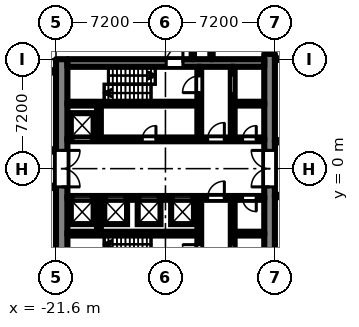
"""IFC4 building model, lengths in metres.
Left out: names, types, materials, properties, quantities, classifications, styles, units other than length and angle.
Written with IfcOpenShell. Run it as: python <this file> out.ifc"""

import sys

from ifc_helpers import new_model, si_unit, direction, frame, frame_2d, origin, place, context, subcontext, project, spatial, rectangle, extrude, element, fill, save


model = new_model("IFC4")
c1 = context("Model", 3, precision=1e-05, world=origin(), true_north=direction((0.0, 1.0)))
c2 = subcontext(c1, "Body", "Model", "MODEL_VIEW")
j1 = project(units=[si_unit("LENGTHUNIT", "METRE"), si_unit("PLANEANGLEUNIT", "RADIAN")], contexts=[c1])
p1 = place(None, origin())
s1 = spatial("IfcSite", under=j1, at=p1, CompositionType="ELEMENT")
p2 = place(p1, origin())
s2 = spatial("IfcBuilding", under=s1, at=p2, CompositionType="ELEMENT")
p3 = place(p2, origin())
s3 = spatial("IfcBuildingStorey", under=s2, at=p3, CompositionType="ELEMENT", Elevation=0.0)
p4 = place(p3, frame((-7.55, -7.548, 0.0), z_axis=(0.0, 0.0, 1.0), x_axis=(0.0, 1.0, 0.0)))
e1 = element("IfcWall", 1, at=p4, inside=s3, PredefinedType="SHEAR", context=c2, shape_type="SweptSolid", body=[
    extrude(rectangle(XDim=15.096, YDim=0.7, at=frame_2d((7.548, 0.0))), origin(), (0.0, 0.0, 1.0), 6.6),
])
p5 = place(p4, frame((6.348, 0.0, 0.0)))
e2 = element("IfcOpeningElement", 2, at=p5, cuts=e1, PredefinedType="OPENING", context=c2, shape_type="SweptSolid", body=[
    extrude(rectangle(XDim=2.4, YDim=2.2, at=frame_2d((1.2, 1.1))), frame((0.0, 0.36, 0.0), z_axis=(0.0, -1.0, 0.0), x_axis=(1.0, 0.0, 0.0)), (0.0, 0.0, 1.0), 0.72),
])
p6 = place(p3, frame((-21.225, -7.2, 0.0), z_axis=(0.0, 0.0, 1.0), x_axis=(0.0, 1.0, 0.0)))
e3 = element("IfcWall", 3, at=p6, inside=s3, PredefinedType="SHEAR", context=c2, shape_type="SweptSolid", body=[
    extrude(rectangle(XDim=14.4, YDim=0.75, at=frame_2d((7.2, 0.0))), origin(), (0.0, 0.0, 1.0), 6.6),
])
p7 = place(p6, frame((6.0, 0.0, 0.0)))
e4 = element("IfcOpeningElement", 4, at=p7, cuts=e3, PredefinedType="OPENING", context=c2, shape_type="SweptSolid", body=[
    extrude(rectangle(XDim=2.4, YDim=2.2, at=frame_2d((1.2, 1.1))), frame((0.0, 0.385, 0.0), z_axis=(0.0, -1.0, 0.0), x_axis=(1.0, 0.0, 0.0)), (0.0, 0.0, 1.0), 0.77),
])
p8 = place(p3, frame((-7.9, 6.95, 0.0), z_axis=(0.0, 0.0, 1.0), x_axis=(-1.0, 0.0, 0.0)))
e5 = element("IfcWall", 5, at=p8, inside=s3, PredefinedType="SHEAR", context=c2, shape_type="SweptSolid", body=[
    extrude(rectangle(XDim=12.95, YDim=0.5, at=frame_2d((6.475, 0.0))), origin(), (0.0, 0.0, 1.0), 6.6),
])
p9 = place(p8, frame((5.35, 0.0, 0.0)))
e6 = element("IfcOpeningElement", 6, at=p9, cuts=e5, PredefinedType="OPENING", context=c2, shape_type="SweptSolid", body=[
    extrude(rectangle(XDim=1.1, YDim=2.1, at=frame_2d((0.55, 1.05))), frame((0.0, 0.26, 0.0), z_axis=(0.0, -1.0, 0.0), x_axis=(1.0, 0.0, 0.0)), (0.0, 0.0, 1.0), 0.52),
])
p10 = place(p3, frame((-7.9, 1.925, 0.0), z_axis=(0.0, 0.0, 1.0), x_axis=(-1.0, 0.0, 0.0)))
e7 = element("IfcWall", 7, at=p10, inside=s3, PredefinedType="SHEAR", context=c2, shape_type="SweptSolid", body=[
    extrude(rectangle(XDim=12.95, YDim=0.25, at=frame_2d((6.475, 0.0))), origin(), (0.0, 0.0, 1.0), 6.6),
])
p11 = place(p10, frame((11.425, 0.0, 0.0)))
e8 = element("IfcOpeningElement", 8, at=p11, cuts=e7, PredefinedType="OPENING", context=c2, shape_type="SweptSolid", body=[
    extrude(rectangle(XDim=1.1, YDim=2.1, at=frame_2d((0.55, 1.05))), frame((0.0, 0.135, 0.0), z_axis=(0.0, -1.0, 0.0), x_axis=(1.0, 0.0, 0.0)), (0.0, 0.0, 1.0), 0.27),
])
p12 = place(p10, frame((0.525, 0.0, 0.0)))
e9 = element("IfcOpeningElement", 9, at=p12, cuts=e7, PredefinedType="OPENING", context=c2, shape_type="SweptSolid", body=[
    extrude(rectangle(XDim=0.9, YDim=2.1, at=frame_2d((0.45, 1.05))), frame((0.0, 0.135, 0.0), z_axis=(0.0, -1.0, 0.0), x_axis=(1.0, 0.0, 0.0)), (0.0, 0.0, 1.0), 0.27),
])
p13 = place(p10, frame((2.625, 0.0, 0.0)))
e10 = element("IfcOpeningElement", 10, at=p13, cuts=e7, PredefinedType="OPENING", context=c2, shape_type="SweptSolid", body=[
    extrude(rectangle(XDim=1.1, YDim=2.1, at=frame_2d((0.55, 1.05))), frame((0.0, 0.135, 0.0), z_axis=(0.0, -1.0, 0.0), x_axis=(1.0, 0.0, 0.0)), (0.0, 0.0, 1.0), 0.27),
])
p14 = place(p10, frame((7.125, 0.0, 0.0)))
e11 = element("IfcOpeningElement", 11, at=p14, cuts=e7, PredefinedType="OPENING", context=c2, shape_type="SweptSolid", body=[
    extrude(rectangle(XDim=0.9, YDim=2.1, at=frame_2d((0.45, 1.05))), frame((0.0, 0.135, 0.0), z_axis=(0.0, -1.0, 0.0), x_axis=(1.0, 0.0, 0.0)), (0.0, 0.0, 1.0), 0.27),
])
p15 = place(p3, frame((-7.9, 4.275, 0.0), z_axis=(0.0, 0.0, 1.0), x_axis=(-1.0, 0.0, 0.0)))
e12 = element("IfcWall", 12, at=p15, inside=s3, PredefinedType="SHEAR", context=c2, shape_type="SweptSolid", body=[
    extrude(rectangle(XDim=1.95, YDim=0.25, at=frame_2d((0.975, 0.0))), origin(), (0.0, 0.0, 1.0), 6.6),
])
p16 = place(p3, frame((-12.3, 4.275, 0.0), z_axis=(0.0, 0.0, 1.0), x_axis=(-1.0, 0.0, 0.0)))
e13 = element("IfcWall", 13, at=p16, inside=s3, PredefinedType="SHEAR", context=c2, shape_type="SweptSolid", body=[
    extrude(rectangle(XDim=8.55, YDim=0.25, at=frame_2d((4.275, 0.0))), origin(), (0.0, 0.0, 1.0), 6.6),
])
p17 = place(p3, frame((-9.975, 2.05, 0.0), z_axis=(0.0, 0.0, 1.0), x_axis=(0.0, 1.0, 0.0)))
e14 = element("IfcWall", 14, at=p17, inside=s3, PredefinedType="SHEAR", context=c2, shape_type="SweptSolid", body=[
    extrude(rectangle(XDim=4.65, YDim=0.25, at=frame_2d((2.325, 0.0))), origin(), (0.0, 0.0, 1.0), 6.6),
])
p18 = place(p17, frame((2.95, 0.0, 0.0)))
e15 = element("IfcOpeningElement", 15, at=p18, cuts=e14, PredefinedType="OPENING", context=c2, shape_type="SweptSolid", body=[
    extrude(rectangle(XDim=1.1, YDim=2.1, at=frame_2d((0.55, 1.05))), frame((0.0, 0.135, 0.0), z_axis=(0.0, -1.0, 0.0), x_axis=(1.0, 0.0, 0.0)), (0.0, 0.0, 1.0), 0.27),
])
p19 = place(p3, frame((-12.175, 2.05, 0.0), z_axis=(0.0, 0.0, 1.0), x_axis=(0.0, 1.0, 0.0)))
e16 = element("IfcWall", 16, at=p19, inside=s3, PredefinedType="SHEAR", context=c2, shape_type="SweptSolid", body=[
    extrude(rectangle(XDim=4.65, YDim=0.25, at=frame_2d((2.325, 0.0))), origin(), (0.0, 0.0, 1.0), 6.6),
])
p20 = place(p19, frame((2.95, 0.0, 0.0)))
e17 = element("IfcOpeningElement", 17, at=p20, cuts=e16, PredefinedType="OPENING", context=c2, shape_type="SweptSolid", body=[
    extrude(rectangle(XDim=1.1, YDim=2.1, at=frame_2d((0.55, 1.05))), frame((0.0, 0.135, 0.0), z_axis=(0.0, -1.0, 0.0), x_axis=(1.0, 0.0, 0.0)), (0.0, 0.0, 1.0), 0.27),
])
p21 = place(p3, frame((-18.775, 2.05, 0.0), z_axis=(0.0, 0.0, 1.0), x_axis=(0.0, 1.0, 0.0)))
e18 = element("IfcWall", 18, at=p21, inside=s3, PredefinedType="PARTITIONING", context=c2, shape_type="SweptSolid", body=[
    extrude(rectangle(XDim=2.1, YDim=0.25, at=frame_2d((1.05, 0.0))), origin(), (0.0, 0.0, 1.0), 6.6),
])
p22 = place(p3, frame((-7.9, -1.925, 0.0), z_axis=(0.0, 0.0, 1.0), x_axis=(-1.0, 0.0, 0.0)))
e19 = element("IfcWall", 19, at=p22, inside=s3, PredefinedType="SHEAR", context=c2, shape_type="SweptSolid", body=[
    extrude(rectangle(XDim=12.95, YDim=0.25, at=frame_2d((6.475, 0.0))), origin(), (0.0, 0.0, 1.0), 6.6),
])
p23 = place(p22, frame((4.825, 0.0, 0.0)))
e20 = element("IfcOpeningElement", 20, at=p23, cuts=e19, PredefinedType="OPENING", context=c2, shape_type="SweptSolid", body=[
    extrude(rectangle(XDim=1.1, YDim=2.1, at=frame_2d((0.55, 1.05))), frame((0.0, 0.135, 0.0), z_axis=(0.0, -1.0, 0.0), x_axis=(1.0, 0.0, 0.0)), (0.0, 0.0, 1.0), 0.27),
])
p24 = place(p22, frame((7.025, 0.0, 0.0)))
e21 = element("IfcOpeningElement", 21, at=p24, cuts=e19, PredefinedType="OPENING", context=c2, shape_type="SweptSolid", body=[
    extrude(rectangle(XDim=1.1, YDim=2.1, at=frame_2d((0.55, 1.05))), frame((0.0, 0.135, 0.0), z_axis=(0.0, -1.0, 0.0), x_axis=(1.0, 0.0, 0.0)), (0.0, 0.0, 1.0), 0.27),
])
p25 = place(p22, frame((9.225, 0.0, 0.0)))
e22 = element("IfcOpeningElement", 22, at=p25, cuts=e19, PredefinedType="OPENING", context=c2, shape_type="SweptSolid", body=[
    extrude(rectangle(XDim=1.1, YDim=2.1, at=frame_2d((0.55, 1.05))), frame((0.0, 0.135, 0.0), z_axis=(0.0, -1.0, 0.0), x_axis=(1.0, 0.0, 0.0)), (0.0, 0.0, 1.0), 0.27),
])
p26 = place(p22, frame((11.425, 0.0, 0.0)))
e23 = element("IfcOpeningElement", 23, at=p26, cuts=e19, PredefinedType="OPENING", context=c2, shape_type="SweptSolid", body=[
    extrude(rectangle(XDim=1.1, YDim=2.1, at=frame_2d((0.55, 1.05))), frame((0.0, 0.135, 0.0), z_axis=(0.0, -1.0, 0.0), x_axis=(1.0, 0.0, 0.0)), (0.0, 0.0, 1.0), 0.27),
])
p27 = place(p22, frame((0.525, 0.0, 0.0)))
e24 = element("IfcOpeningElement", 24, at=p27, cuts=e19, PredefinedType="OPENING", context=c2, shape_type="SweptSolid", body=[
    extrude(rectangle(XDim=0.9, YDim=2.1, at=frame_2d((0.45, 1.05))), frame((0.0, 0.135, 0.0), z_axis=(0.0, -1.0, 0.0), x_axis=(1.0, 0.0, 0.0)), (0.0, 0.0, 1.0), 0.27),
])
p28 = place(p22, frame((2.625, 0.0, 0.0)))
e25 = element("IfcOpeningElement", 25, at=p28, cuts=e19, PredefinedType="OPENING", context=c2, shape_type="SweptSolid", body=[
    extrude(rectangle(XDim=1.1, YDim=2.1, at=frame_2d((0.55, 1.05))), frame((0.0, 0.135, 0.0), z_axis=(0.0, -1.0, 0.0), x_axis=(1.0, 0.0, 0.0)), (0.0, 0.0, 1.0), 0.27),
])
p29 = place(p3, frame((-7.9, -4.275, 0.0), z_axis=(0.0, 0.0, 1.0), x_axis=(-1.0, 0.0, 0.0)))
e26 = element("IfcWall", 26, at=p29, inside=s3, PredefinedType="SHEAR", context=c2, shape_type="SweptSolid", body=[
    extrude(rectangle(XDim=1.95, YDim=0.25, at=frame_2d((0.975, 0.0))), origin(), (0.0, 0.0, 1.0), 6.6),
])
p30 = place(p3, frame((-12.3, -4.275, 0.0), z_axis=(0.0, 0.0, 1.0), x_axis=(-1.0, 0.0, 0.0)))
e27 = element("IfcWall", 27, at=p30, inside=s3, PredefinedType="SHEAR", context=c2, shape_type="SweptSolid", body=[
    extrude(rectangle(XDim=8.55, YDim=0.25, at=frame_2d((4.275, 0.0))), origin(), (0.0, 0.0, 1.0), 6.6),
])
p31 = place(p3, frame((-9.975, -2.05, 0.0), z_axis=(0.0, 0.0, 1.0), x_axis=(0.0, -1.0, 0.0)))
e28 = element("IfcWall", 28, at=p31, inside=s3, PredefinedType="SHEAR", context=c2, shape_type="SweptSolid", body=[
    extrude(rectangle(XDim=4.65, YDim=0.25, at=frame_2d((2.325, 0.0))), origin(), (0.0, 0.0, 1.0), 6.6),
])
p32 = place(p31, frame((2.95, 0.0, 0.0)))
e29 = element("IfcOpeningElement", 29, at=p32, cuts=e28, PredefinedType="OPENING", context=c2, shape_type="SweptSolid", body=[
    extrude(rectangle(XDim=1.1, YDim=2.1, at=frame_2d((0.55, 1.05))), frame((0.0, 0.135, 0.0), z_axis=(0.0, -1.0, 0.0), x_axis=(1.0, 0.0, 0.0)), (0.0, 0.0, 1.0), 0.27),
])
p33 = place(p3, frame((-12.175, -2.05, 0.0), z_axis=(0.0, 0.0, 1.0), x_axis=(0.0, -1.0, 0.0)))
e30 = element("IfcWall", 30, at=p33, inside=s3, PredefinedType="SHEAR", context=c2, shape_type="SweptSolid", body=[
    extrude(rectangle(XDim=4.65, YDim=0.25, at=frame_2d((2.325, 0.0))), origin(), (0.0, 0.0, 1.0), 6.6),
])
p34 = place(p33, frame((2.95, 0.0, 0.0)))
e31 = element("IfcOpeningElement", 31, at=p34, cuts=e30, PredefinedType="OPENING", context=c2, shape_type="SweptSolid", body=[
    extrude(rectangle(XDim=1.1, YDim=2.1, at=frame_2d((0.55, 1.05))), frame((0.0, 0.135, 0.0), z_axis=(0.0, -1.0, 0.0), x_axis=(1.0, 0.0, 0.0)), (0.0, 0.0, 1.0), 0.27),
])
p35 = place(p3, frame((-18.775, -2.05, 0.0), z_axis=(0.0, 0.0, 1.0), x_axis=(0.0, -1.0, 0.0)))
e32 = element("IfcWall", 32, at=p35, inside=s3, PredefinedType="PARTITIONING", context=c2, shape_type="SweptSolid", body=[
    extrude(rectangle(XDim=2.1, YDim=0.25, at=frame_2d((1.05, 0.0))), origin(), (0.0, 0.0, 1.0), 6.6),
])
p36 = place(p3, frame((-50.22, 6.4, 0.0), z_axis=(0.0, 0.0, 1.0), x_axis=(1.0, 0.0, 0.0)))
e33 = element("IfcWall", 33, at=p36, inside=s3, PredefinedType="PARTITIONING", context=c2, shape_type="SweptSolid", body=[
    extrude(rectangle(XDim=28.62, YDim=0.15, at=frame_2d((14.31, 0.0))), origin(), (0.0, 0.0, 1.0), 6.6),
])
p37 = place(p36, frame((16.82, 0.0, 0.0)))
e34 = element("IfcOpeningElement", 34, at=p37, cuts=e33, PredefinedType="OPENING", context=c2, shape_type="SweptSolid", body=[
    extrude(rectangle(XDim=2.0, YDim=2.1, at=frame_2d((1.0, 1.05))), frame((0.0, 0.085, 0.0), z_axis=(0.0, -1.0, 0.0), x_axis=(1.0, 0.0, 0.0)), (0.0, 0.0, 1.0), 0.17),
])
for number, where, z_axis, x_axis in (
    (35, (-31.125, -1.2, 0.0), (0.0, 0.0, 1.0), (1.0, 0.0, 0.0)),
    (36, (-31.125, 1.2, 0.0), (0.0, 0.0, 1.0), (1.0, 0.0, 0.0)),
):
    element("IfcWall", number, at=place(p3, frame(where, z_axis=z_axis, x_axis=x_axis)), inside=s3, PredefinedType="PARTITIONING", context=c2, shape_type="SweptSolid", body=[
        extrude(rectangle(XDim=9.525, YDim=0.15, at=frame_2d((4.762, 0.0))), origin(), (0.0, 0.0, 1.0), 6.6),
    ])
p38 = place(p3, frame((-12.6, 7.2, 0.0), z_axis=(0.0, 0.0, 1.0), x_axis=(0.0, 1.0, 0.0)))
e37 = element("IfcWall", 37, at=p38, inside=s3, PredefinedType="PARTITIONING", context=c2, shape_type="SweptSolid", body=[
    extrude(rectangle(XDim=3.125, YDim=0.15, at=frame_2d((1.562, 0.0))), origin(), (0.0, 0.0, 1.0), 6.6),
])
p39 = place(p3, frame((-11.37, 7.2, 0.0), z_axis=(0.0, 0.0, 1.0), x_axis=(0.0, 1.0, 0.0)))
e38 = element("IfcWall", 38, at=p39, inside=s3, PredefinedType="PARTITIONING", context=c2, shape_type="SweptSolid", body=[
    extrude(rectangle(XDim=9.525, YDim=0.15, at=frame_2d((4.763, 0.0))), origin(), (0.0, 0.0, 1.0), 6.6),
])
p40 = place(p3, frame((-7.2, -1.8, 0.0), z_axis=(0.0, 0.0, 1.0), x_axis=(1.0, 0.0, 0.0)))
e39 = element("IfcWall", 39, at=p40, inside=s3, PredefinedType="PARTITIONING", context=c2, shape_type="SweptSolid", body=[
    extrude(rectangle(XDim=5.475, YDim=0.15, at=frame_2d((2.737, 0.0))), origin(), (0.0, 0.0, 1.0), 6.6),
])
p41 = place(p3, frame((-7.2, 1.8, 0.0), z_axis=(0.0, 0.0, 1.0), x_axis=(1.0, 0.0, 0.0)))
e40 = element("IfcWall", 40, at=p41, inside=s3, PredefinedType="PARTITIONING", context=c2, shape_type="SweptSolid", body=[
    extrude(rectangle(XDim=5.475, YDim=0.15, at=frame_2d((2.737, 0.0))), origin(), (0.0, 0.0, 1.0), 6.6),
])
p42 = place(p41, frame((4.4, 0.0, 0.0)))
e41 = element("IfcOpeningElement", 41, at=p42, cuts=e40, PredefinedType="OPENING", context=c2, shape_type="SweptSolid", body=[
    extrude(rectangle(XDim=0.9, YDim=2.1, at=frame_2d((0.45, 1.05))), frame((0.0, 0.085, 0.0), z_axis=(0.0, -1.0, 0.0), x_axis=(1.0, 0.0, 0.0)), (0.0, 0.0, 1.0), 0.17),
])
p43 = place(p3, frame((-7.2, 7.2, 0.0), z_axis=(0.0, 0.0, 1.0), x_axis=(1.0, 0.0, 0.0)))
e42 = element("IfcWall", 42, at=p43, inside=s3, PredefinedType="PARTITIONING", context=c2, shape_type="SweptSolid", body=[
    extrude(rectangle(XDim=5.4, YDim=0.1, at=frame_2d((2.7, 0.0))), origin(), (0.0, 0.0, 1.0), 6.6),
])
p44 = place(p23, origin())
e43 = element("IfcDoor", 43, at=p44, inside=s3, OperationType="SLIDING_TO_LEFT", PredefinedType="DOOR", context=c2, shape_type="SweptSolid", body=[
    extrude(rectangle(XDim=1.1, YDim=2.1, at=frame_2d((0.55, 1.05))), frame((0.0, 0.025, 0.0), z_axis=(0.0, -1.0, 0.0), x_axis=(1.0, 0.0, 0.0)), (0.0, 0.0, 1.0), 0.05),
])
fill(e20, e43)
p45 = place(p24, origin())
e44 = element("IfcDoor", 44, at=p45, inside=s3, OperationType="SLIDING_TO_LEFT", PredefinedType="DOOR", context=c2, shape_type="SweptSolid", body=[
    extrude(rectangle(XDim=1.1, YDim=2.1, at=frame_2d((0.55, 1.05))), frame((0.0, 0.025, 0.0), z_axis=(0.0, -1.0, 0.0), x_axis=(1.0, 0.0, 0.0)), (0.0, 0.0, 1.0), 0.05),
])
fill(e21, e44)
p46 = place(p25, origin())
e45 = element("IfcDoor", 45, at=p46, inside=s3, OperationType="SLIDING_TO_LEFT", PredefinedType="DOOR", context=c2, shape_type="SweptSolid", body=[
    extrude(rectangle(XDim=1.1, YDim=2.1, at=frame_2d((0.55, 1.05))), frame((0.0, 0.025, 0.0), z_axis=(0.0, -1.0, 0.0), x_axis=(1.0, 0.0, 0.0)), (0.0, 0.0, 1.0), 0.05),
])
fill(e22, e45)
p47 = place(p26, origin())
e46 = element("IfcDoor", 46, at=p47, inside=s3, OperationType="SLIDING_TO_LEFT", PredefinedType="DOOR", context=c2, shape_type="SweptSolid", body=[
    extrude(rectangle(XDim=1.1, YDim=2.1, at=frame_2d((0.55, 1.05))), frame((0.0, 0.025, 0.0), z_axis=(0.0, -1.0, 0.0), x_axis=(1.0, 0.0, 0.0)), (0.0, 0.0, 1.0), 0.05),
])
fill(e23, e46)
p48 = place(p11, origin())
e47 = element("IfcDoor", 47, at=p48, inside=s3, OperationType="SLIDING_TO_LEFT", PredefinedType="DOOR", context=c2, shape_type="SweptSolid", body=[
    extrude(rectangle(XDim=1.1, YDim=2.1, at=frame_2d((0.55, 1.05))), frame((0.0, 0.025, 0.0), z_axis=(0.0, -1.0, 0.0), x_axis=(1.0, 0.0, 0.0)), (0.0, 0.0, 1.0), 0.05),
])
fill(e8, e47)
p49 = place(p18, origin())
e48 = element("IfcDoor", 48, at=p49, inside=s3, OperationType="SLIDING_TO_LEFT", PredefinedType="DOOR", context=c2, shape_type="SweptSolid", body=[
    extrude(rectangle(XDim=1.1, YDim=2.1, at=frame_2d((0.55, 1.05))), frame((0.0, 0.025, 0.0), z_axis=(0.0, -1.0, 0.0), x_axis=(1.0, 0.0, 0.0)), (0.0, 0.0, 1.0), 0.05),
])
fill(e15, e48)
p50 = place(p32, origin())
e49 = element("IfcDoor", 49, at=p50, inside=s3, OperationType="SLIDING_TO_LEFT", PredefinedType="DOOR", context=c2, shape_type="SweptSolid", body=[
    extrude(rectangle(XDim=1.1, YDim=2.1, at=frame_2d((0.55, 1.05))), frame((0.0, 0.025, 0.0), z_axis=(0.0, -1.0, 0.0), x_axis=(1.0, 0.0, 0.0)), (0.0, 0.0, 1.0), 0.05),
])
fill(e29, e49)
p51 = place(p20, origin())
e50 = element("IfcDoor", 50, at=p51, inside=s3, OperationType="SINGLE_SWING_LEFT", PredefinedType="DOOR", context=c2, shape_type="SweptSolid", body=[
    extrude(rectangle(XDim=1.1, YDim=2.1, at=frame_2d((0.55, 1.05))), frame((0.0, 0.025, 0.0), z_axis=(0.0, -1.0, 0.0), x_axis=(1.0, 0.0, 0.0)), (0.0, 0.0, 1.0), 0.05),
])
fill(e17, e50)
p52 = place(p34, frame((1.1, 0.0, 0.0), z_axis=(0.0, 0.0, 1.0), x_axis=(-1.0, 0.0, 0.0)))
e51 = element("IfcDoor", 51, at=p52, inside=s3, OperationType="SINGLE_SWING_RIGHT", PredefinedType="DOOR", context=c2, shape_type="SweptSolid", body=[
    extrude(rectangle(XDim=1.1, YDim=2.1, at=frame_2d((0.55, 1.05))), frame((0.0, 0.025, 0.0), z_axis=(0.0, -1.0, 0.0), x_axis=(1.0, 0.0, 0.0)), (0.0, 0.0, 1.0), 0.05),
])
fill(e31, e51)
p53 = place(p12, frame((0.9, 0.0, 0.0), z_axis=(0.0, 0.0, 1.0), x_axis=(-1.0, 0.0, 0.0)))
e52 = element("IfcDoor", 52, at=p53, inside=s3, OperationType="SINGLE_SWING_RIGHT", PredefinedType="DOOR", context=c2, shape_type="SweptSolid", body=[
    extrude(rectangle(XDim=0.9, YDim=2.1, at=frame_2d((0.45, 1.05))), frame((0.0, 0.025, 0.0), z_axis=(0.0, -1.0, 0.0), x_axis=(1.0, 0.0, 0.0)), (0.0, 0.0, 1.0), 0.05),
])
fill(e9, e52)
p54 = place(p27, origin())
e53 = element("IfcDoor", 53, at=p54, inside=s3, OperationType="SINGLE_SWING_LEFT", PredefinedType="DOOR", context=c2, shape_type="SweptSolid", body=[
    extrude(rectangle(XDim=0.9, YDim=2.1, at=frame_2d((0.45, 1.05))), frame((0.0, 0.025, 0.0), z_axis=(0.0, -1.0, 0.0), x_axis=(1.0, 0.0, 0.0)), (0.0, 0.0, 1.0), 0.05),
])
fill(e24, e53)
p55 = place(p13, frame((1.1, 0.0, 0.0), z_axis=(0.0, 0.0, 1.0), x_axis=(-1.0, 0.0, 0.0)))
e54 = element("IfcDoor", 54, at=p55, inside=s3, OperationType="SINGLE_SWING_RIGHT", PredefinedType="DOOR", context=c2, shape_type="SweptSolid", body=[
    extrude(rectangle(XDim=1.1, YDim=2.1, at=frame_2d((0.55, 1.05))), frame((0.0, 0.025, 0.0), z_axis=(0.0, -1.0, 0.0), x_axis=(1.0, 0.0, 0.0)), (0.0, 0.0, 1.0), 0.05),
])
fill(e10, e54)
p56 = place(p28, frame((1.1, 0.0, 0.0), z_axis=(0.0, 0.0, 1.0), x_axis=(-1.0, 0.0, 0.0)))
e55 = element("IfcDoor", 55, at=p56, inside=s3, OperationType="SINGLE_SWING_RIGHT", PredefinedType="DOOR", context=c2, shape_type="SweptSolid", body=[
    extrude(rectangle(XDim=1.1, YDim=2.1, at=frame_2d((0.55, 1.05))), frame((0.0, 0.025, 0.0), z_axis=(0.0, -1.0, 0.0), x_axis=(1.0, 0.0, 0.0)), (0.0, 0.0, 1.0), 0.05),
])
fill(e25, e55)
p57 = place(p5, origin())
e56 = element("IfcDoor", 56, at=p57, inside=s3, OperationType="DOUBLE_DOOR_DOUBLE_SWING", PredefinedType="DOOR", context=c2, shape_type="SweptSolid", body=[
    extrude(rectangle(XDim=2.4, YDim=2.2, at=frame_2d((1.2, 1.1))), frame((0.0, 0.025, 0.0), z_axis=(0.0, -1.0, 0.0), x_axis=(1.0, 0.0, 0.0)), (0.0, 0.0, 1.0), 0.05),
])
fill(e2, e56)
p58 = place(p7, frame((2.4, 0.0, 0.0), z_axis=(0.0, 0.0, 1.0), x_axis=(-1.0, 0.0, 0.0)))
e57 = element("IfcDoor", 57, at=p58, inside=s3, OperationType="DOUBLE_DOOR_DOUBLE_SWING", PredefinedType="DOOR", context=c2, shape_type="SweptSolid", body=[
    extrude(rectangle(XDim=2.4, YDim=2.2, at=frame_2d((1.2, 1.1))), frame((0.0, 0.025, 0.0), z_axis=(0.0, -1.0, 0.0), x_axis=(1.0, 0.0, 0.0)), (0.0, 0.0, 1.0), 0.05),
])
fill(e4, e57)
p59 = place(p14, frame((0.9, 0.0, 0.0), z_axis=(0.0, 0.0, 1.0), x_axis=(-1.0, 0.0, 0.0)))
e58 = element("IfcDoor", 58, at=p59, inside=s3, OperationType="SINGLE_SWING_RIGHT", PredefinedType="DOOR", context=c2, shape_type="SweptSolid", body=[
    extrude(rectangle(XDim=0.9, YDim=2.1, at=frame_2d((0.45, 1.05))), frame((0.0, 0.025, 0.0), z_axis=(0.0, -1.0, 0.0), x_axis=(1.0, 0.0, 0.0)), (0.0, 0.0, 1.0), 0.05),
])
fill(e11, e58)
p60 = place(p9, frame((1.1, 0.0, 0.0), z_axis=(0.0, 0.0, 1.0), x_axis=(-1.0, 0.0, 0.0)))
e59 = element("IfcDoor", 59, at=p60, inside=s3, OperationType="SINGLE_SWING_RIGHT", PredefinedType="DOOR", context=c2, shape_type="SweptSolid", body=[
    extrude(rectangle(XDim=1.1, YDim=2.1, at=frame_2d((0.55, 1.05))), frame((0.0, 0.025, 0.0), z_axis=(0.0, -1.0, 0.0), x_axis=(1.0, 0.0, 0.0)), (0.0, 0.0, 1.0), 0.05),
])
fill(e6, e59)
save(model, sys.argv[1])
